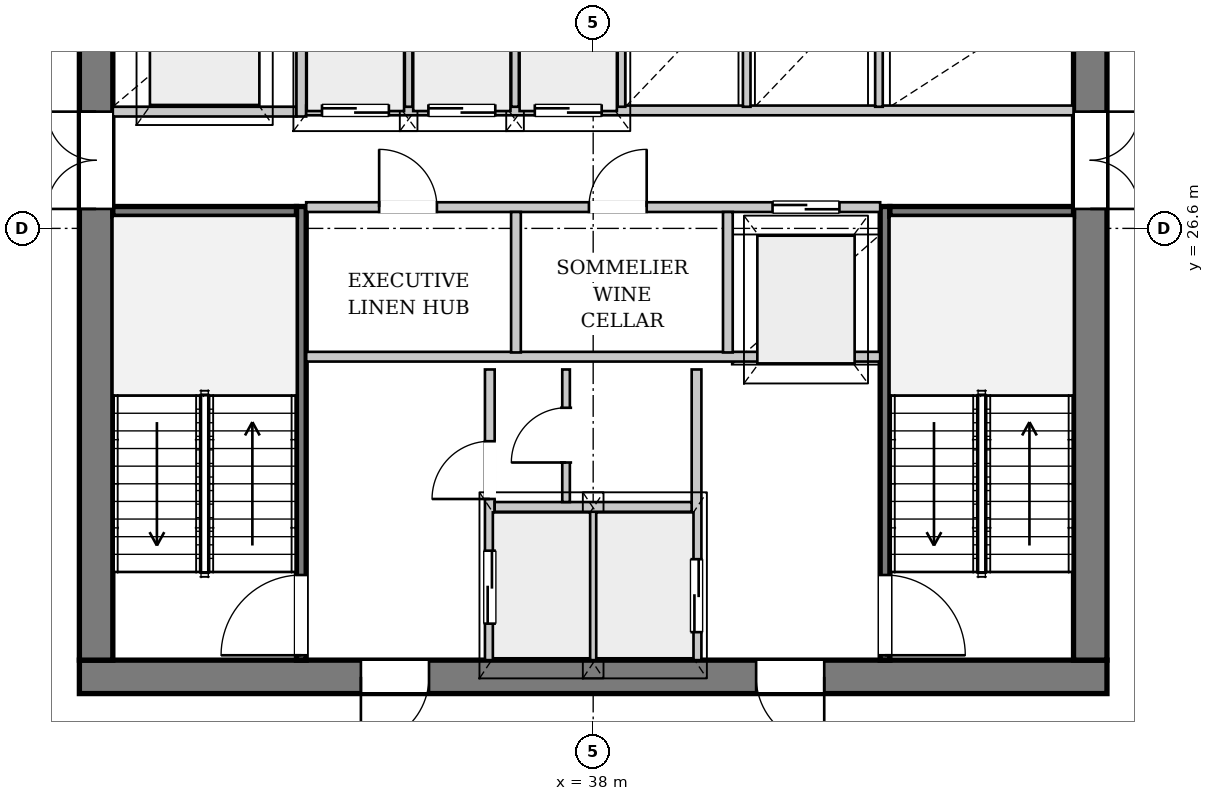
"""IFC4 building model, lengths in metres.
Left out: names, types, materials, properties, quantities, classifications, styles, units other than length and angle.
Written with IfcOpenShell. Run it as: python <this file> out.ifc"""

import sys

from ifc_helpers import new_model, si_unit, direction, frame, frame_2d, origin, place, context, subcontext, project, spatial, rectangle, extrude, source, transform, mapped, element, fill, save


model = new_model("IFC4")
c1 = context("Model", 3, precision=1e-05, world=origin(), true_north=direction((0.0, 1.0)))
c2 = subcontext(c1, "Body", "Model", "MODEL_VIEW")
j1 = project(units=[si_unit("LENGTHUNIT", "METRE"), si_unit("PLANEANGLEUNIT", "RADIAN")], contexts=[c1])
p1 = place(None, origin())
s1 = spatial("IfcSite", under=j1, at=p1, CompositionType="ELEMENT")
p2 = place(p1, origin())
s2 = spatial("IfcBuilding", under=s1, at=p2, CompositionType="ELEMENT")
p3 = place(p2, frame((0.0, 0.0, 150.15)))
s3 = spatial("IfcBuildingStorey", under=s2, at=p3, CompositionType="ELEMENT", Elevation=150.15)
p4 = place(p3, frame((52.782, 18.811, 0.0), z_axis=(0.0, 0.0, 1.0), x_axis=(-0.720961083524, -0.69297555227, 0.0)))
e1 = element("IfcWall", 1, at=p4, inside=s3, PredefinedType="SOLIDWALL", context=c2, shape_type="SweptSolid", body=[
    extrude(rectangle(XDim=23.598, YDim=0.32, at=frame_2d((11.799, 0.0))), origin(), (0.0, 0.0, 1.0), 2.692),
])
p5 = place(p4, frame((6.801, 0.0, 0.0)))
e2 = element("IfcOpeningElement", 2, at=p5, cuts=e1, PredefinedType="OPENING", context=c2, shape_type="SweptSolid", body=[
    extrude(rectangle(XDim=1.5, YDim=2.3, at=frame_2d((0.75, 1.15))), frame((0.0, 0.17, 0.0), z_axis=(0.0, -1.0, 0.0), x_axis=(1.0, 0.0, 0.0)), (0.0, 0.0, 1.0), 0.34),
])
p6 = place(p4, frame((16.163, 0.0, 0.25)))
e3 = element("IfcOpeningElement", 3, at=p6, cuts=e1, PredefinedType="OPENING", context=c2, shape_type="SweptSolid", body=[
    extrude(rectangle(XDim=2.6, YDim=2.35, at=frame_2d((1.3, 1.175))), frame((0.0, 0.17, 0.0), z_axis=(0.0, -1.0, 0.0), x_axis=(1.0, 0.0, 0.0)), (0.0, 0.0, 1.0), 0.34),
])
p7 = place(p3, frame((46.45, 19.225, 0.0), z_axis=(0.0, 0.0, 1.0), x_axis=(-1.0, 0.0, 0.0)))
e4 = element("IfcWall", 4, at=p7, inside=s3, PredefinedType="SHEAR", context=c2, shape_type="SweptSolid", body=[
    extrude(rectangle(XDim=16.9, YDim=0.55, at=frame_2d((8.45, 0.0))), origin(), (0.0, 0.0, 1.0), 3.3),
])
p8 = place(p7, frame((4.65, 0.0, 0.0)))
e5 = element("IfcOpeningElement", 5, at=p8, cuts=e4, PredefinedType="OPENING", context=c2, shape_type="SweptSolid", body=[
    extrude(rectangle(XDim=1.12, YDim=2.25, at=frame_2d((0.56, 1.125))), frame((0.0, 0.285, 0.0), z_axis=(0.0, -1.0, 0.0), x_axis=(1.0, 0.0, 0.0)), (0.0, 0.0, 1.0), 0.57),
])
p9 = place(p7, frame((11.15, 0.0, 0.0)))
e6 = element("IfcOpeningElement", 6, at=p9, cuts=e4, PredefinedType="OPENING", context=c2, shape_type="SweptSolid", body=[
    extrude(rectangle(XDim=1.12, YDim=2.25, at=frame_2d((0.56, 1.125))), frame((0.0, 0.285, 0.0), z_axis=(0.0, -1.0, 0.0), x_axis=(1.0, 0.0, 0.0)), (0.0, 0.0, 1.0), 0.57),
])
p10 = place(p3, frame((29.825, 19.5, 0.0), z_axis=(0.0, 0.0, 1.0), x_axis=(0.0, 1.0, 0.0)))
e7 = element("IfcWall", 7, at=p10, inside=s3, PredefinedType="SHEAR", context=c2, shape_type="SweptSolid", body=[
    extrude(rectangle(XDim=14.2, YDim=0.55, at=frame_2d((7.1, 0.0))), origin(), (0.0, 0.0, 1.0), 3.3),
])
p11 = place(p10, frame((7.42, 0.0, 0.0)))
e8 = element("IfcOpeningElement", 8, at=p11, cuts=e7, PredefinedType="OPENING", context=c2, shape_type="SweptSolid", body=[
    extrude(rectangle(XDim=1.6, YDim=2.2, at=frame_2d((0.8, 1.1))), frame((0.0, 0.285, 0.0), z_axis=(0.0, -1.0, 0.0), x_axis=(1.0, 0.0, 0.0)), (0.0, 0.0, 1.0), 0.57),
])
p12 = place(p3, frame((46.175, 33.7, 0.0), z_axis=(0.0, 0.0, 1.0), x_axis=(0.0, -1.0, 0.0)))
e9 = element("IfcWall", 9, at=p12, inside=s3, PredefinedType="SHEAR", context=c2, shape_type="SweptSolid", body=[
    extrude(rectangle(XDim=14.2, YDim=0.55, at=frame_2d((7.1, 0.0))), origin(), (0.0, 0.0, 1.0), 3.3),
])
p13 = place(p12, frame((5.18, 0.0, 0.0)))
e10 = element("IfcOpeningElement", 10, at=p13, cuts=e9, PredefinedType="OPENING", context=c2, shape_type="SweptSolid", body=[
    extrude(rectangle(XDim=1.6, YDim=2.2, at=frame_2d((0.8, 1.1))), frame((0.0, 0.285, 0.0), z_axis=(0.0, -1.0, 0.0), x_axis=(1.0, 0.0, 0.0)), (0.0, 0.0, 1.0), 0.57),
])
p14 = place(p12, frame((2.05, 0.0, 0.0)))
e11 = element("IfcOpeningElement", 11, at=p14, cuts=e9, PredefinedType="OPENING", context=c2, shape_type="SweptSolid", body=[
    extrude(rectangle(XDim=0.95, YDim=2.1, at=frame_2d((0.475, 1.05))), frame((0.0, 0.285, 0.0), z_axis=(0.0, -1.0, 0.0), x_axis=(1.0, 0.0, 0.0)), (0.0, 0.0, 1.0), 0.57),
])
p15 = place(p3, frame((33.2, 19.5, 0.0), z_axis=(0.0, 0.0, 1.0), x_axis=(0.0, 1.0, 0.0)))
e12 = element("IfcWall", 12, at=p15, inside=s3, PredefinedType="PARTITIONING", context=c2, shape_type="SweptSolid", body=[
    extrude(rectangle(XDim=7.46, YDim=0.16, at=frame_2d((3.73, 0.0))), origin(), (0.0, 0.0, 1.0), 3.3),
])
p16 = place(p15, frame((0.08, 0.0, 0.0)))
e13 = element("IfcOpeningElement", 13, at=p16, cuts=e12, PredefinedType="OPENING", context=c2, shape_type="SweptSolid", body=[
    extrude(rectangle(XDim=1.32, YDim=2.2, at=frame_2d((0.66, 1.1))), frame((0.0, 0.09, 0.0), z_axis=(0.0, -1.0, 0.0), x_axis=(1.0, 0.0, 0.0)), (0.0, 0.0, 1.0), 0.18),
])
p17 = place(p3, frame((30.1, 26.88, 0.0), z_axis=(0.0, 0.0, 1.0), x_axis=(1.0, 0.0, 0.0)))
e14 = element("IfcWall", 14, at=p17, inside=s3, PredefinedType="PARTITIONING", context=c2, shape_type="SweptSolid", body=[
    extrude(rectangle(XDim=3.02, YDim=0.16, at=frame_2d((1.51, 0.0))), origin(), (0.0, 0.0, 1.0), 3.3),
])
p18 = place(p3, frame((42.8, 26.96, 0.0), z_axis=(0.0, 0.0, 1.0), x_axis=(0.0, -1.0, 0.0)))
e15 = element("IfcWall", 15, at=p18, inside=s3, PredefinedType="PARTITIONING", context=c2, shape_type="SweptSolid", body=[
    extrude(rectangle(XDim=7.46, YDim=0.16, at=frame_2d((3.73, 0.0))), origin(), (0.0, 0.0, 1.0), 3.3),
])
p19 = place(p18, frame((6.06, 0.0, 0.0)))
e16 = element("IfcOpeningElement", 16, at=p19, cuts=e15, PredefinedType="OPENING", context=c2, shape_type="SweptSolid", body=[
    extrude(rectangle(XDim=1.32, YDim=2.2, at=frame_2d((0.66, 1.1))), frame((0.0, 0.09, 0.0), z_axis=(0.0, -1.0, 0.0), x_axis=(1.0, 0.0, 0.0)), (0.0, 0.0, 1.0), 0.18),
])
p20 = place(p3, frame((42.88, 26.88, 0.0), z_axis=(0.0, 0.0, 1.0), x_axis=(1.0, 0.0, 0.0)))
e17 = element("IfcWall", 17, at=p20, inside=s3, PredefinedType="PARTITIONING", context=c2, shape_type="SweptSolid", body=[
    extrude(rectangle(XDim=3.02, YDim=0.16, at=frame_2d((1.51, 0.0))), origin(), (0.0, 0.0, 1.0), 3.3),
])
p21 = place(p3, frame((36.3, 19.5, 0.0), z_axis=(0.0, 0.0, 1.0), x_axis=(0.0, 1.0, 0.0)))
e18 = element("IfcWall", 18, at=p21, inside=s3, PredefinedType="PARTITIONING", context=c2, shape_type="SweptSolid", body=[
    extrude(rectangle(XDim=4.78, YDim=0.16, at=frame_2d((2.39, 0.0))), origin(), (0.0, 0.0, 1.0), 3.3),
])
p22 = place(p21, frame((0.6, 0.0, 0.0)))
e19 = element("IfcOpeningElement", 19, at=p22, cuts=e18, PredefinedType="OPENING", context=c2, shape_type="SweptSolid", body=[
    extrude(rectangle(XDim=1.2, YDim=2.2, at=frame_2d((0.6, 1.1))), frame((0.0, 0.09, 0.0), z_axis=(0.0, -1.0, 0.0), x_axis=(1.0, 0.0, 0.0)), (0.0, 0.0, 1.0), 0.18),
])
p23 = place(p21, frame((2.65, 0.0, 0.0)))
e20 = element("IfcOpeningElement", 20, at=p23, cuts=e18, PredefinedType="OPENING", context=c2, shape_type="SweptSolid", body=[
    extrude(rectangle(XDim=0.95, YDim=2.1, at=frame_2d((0.475, 1.05))), frame((0.0, 0.09, 0.0), z_axis=(0.0, -1.0, 0.0), x_axis=(1.0, 0.0, 0.0)), (0.0, 0.0, 1.0), 0.18),
])
p24 = place(p3, frame((39.7, 24.28, 0.0), z_axis=(0.0, 0.0, 1.0), x_axis=(0.0, -1.0, 0.0)))
e21 = element("IfcWall", 21, at=p24, inside=s3, PredefinedType="PARTITIONING", context=c2, shape_type="SweptSolid", body=[
    extrude(rectangle(XDim=4.78, YDim=0.16, at=frame_2d((2.39, 0.0))), origin(), (0.0, 0.0, 1.0), 3.3),
])
p25 = place(p24, frame((3.12, 0.0, 0.0)))
e22 = element("IfcOpeningElement", 22, at=p25, cuts=e21, PredefinedType="OPENING", context=c2, shape_type="SweptSolid", body=[
    extrude(rectangle(XDim=1.2, YDim=2.2, at=frame_2d((0.6, 1.1))), frame((0.0, 0.09, 0.0), z_axis=(0.0, -1.0, 0.0), x_axis=(1.0, 0.0, 0.0)), (0.0, 0.0, 1.0), 0.18),
])
p26 = place(p3, frame((38.0, 19.5, 0.0), z_axis=(0.0, 0.0, 1.0), x_axis=(0.0, 1.0, 0.0)))
e23 = element("IfcWall", 23, at=p26, inside=s3, PredefinedType="PARTITIONING", context=c2, shape_type="SweptSolid", body=[
    extrude(rectangle(XDim=2.46, YDim=0.125, at=frame_2d((1.23, 0.0))), origin(), (0.0, 0.0, 1.0), 3.3),
])
p27 = place(p3, frame((36.38, 22.02, 0.0), z_axis=(0.0, 0.0, 1.0), x_axis=(1.0, 0.0, 0.0)))
e24 = element("IfcWall", 24, at=p27, inside=s3, PredefinedType="PARTITIONING", context=c2, shape_type="SweptSolid", body=[
    extrude(rectangle(XDim=3.24, YDim=0.16, at=frame_2d((1.62, 0.0))), origin(), (0.0, 0.0, 1.0), 3.3),
])
p28 = place(p3, frame((33.28, 24.49, 0.0), z_axis=(0.0, 0.0, 1.0), x_axis=(1.0, 0.0, 0.0)))
e25 = element("IfcWall", 25, at=p28, inside=s3, PredefinedType="PARTITIONING", context=c2, shape_type="SweptSolid", body=[
    extrude(rectangle(XDim=9.44, YDim=0.16, at=frame_2d((4.72, 0.0))), origin(), (0.0, 0.0, 1.0), 3.3),
])
p29 = place(p3, frame((37.554, 22.1, 0.0), z_axis=(0.0, 0.0, 1.0), x_axis=(0.0, 1.0, 0.0)))
e26 = element("IfcWall", 26, at=p29, inside=s3, PredefinedType="PARTITIONING", context=c2, shape_type="SweptSolid", body=[
    extrude(rectangle(XDim=2.18, YDim=0.125, at=frame_2d((1.09, 0.0))), origin(), (0.0, 0.0, 1.0), 3.3),
])
p30 = place(p29, frame((0.65, 0.0, 0.0)))
e27 = element("IfcOpeningElement", 27, at=p30, cuts=e26, PredefinedType="OPENING", context=c2, shape_type="SweptSolid", body=[
    extrude(rectangle(XDim=0.9, YDim=2.1, at=frame_2d((0.45, 1.05))), frame((0.0, 0.073, 0.0), z_axis=(0.0, -1.0, 0.0), x_axis=(1.0, 0.0, 0.0)), (0.0, 0.0, 1.0), 0.145),
])
p31 = place(p3, frame((30.1, 28.52, 0.0), z_axis=(0.0, 0.0, 1.0), x_axis=(1.0, 0.0, 0.0)))
e28 = element("IfcWall", 28, at=p31, inside=s3, PredefinedType="PARTITIONING", context=c2, shape_type="SweptSolid", body=[
    extrude(rectangle(XDim=3.02, YDim=0.16, at=frame_2d((1.51, 0.0))), origin(), (0.0, 0.0, 1.0), 3.3),
])
p32 = place(p3, frame((33.2, 28.44, 0.0), z_axis=(0.0, 0.0, 1.0), x_axis=(0.0, 1.0, 0.0)))
e29 = element("IfcWall", 29, at=p32, inside=s3, PredefinedType="PARTITIONING", context=c2, shape_type="SweptSolid", body=[
    extrude(rectangle(XDim=5.26, YDim=0.16, at=frame_2d((2.63, 0.0))), origin(), (0.0, 0.0, 1.0), 3.3),
])
p33 = place(p3, frame((33.28, 26.95, 0.0), z_axis=(0.0, 0.0, 1.0), x_axis=(1.0, 0.0, 0.0)))
e30 = element("IfcWall", 30, at=p33, inside=s3, PredefinedType="PARTITIONING", context=c2, shape_type="SweptSolid", body=[
    extrude(rectangle(XDim=9.44, YDim=0.16, at=frame_2d((4.72, 0.0))), origin(), (0.0, 0.0, 1.0), 3.3),
])
p34 = place(p33, frame((1.2, 0.0, 0.0)))
e31 = element("IfcOpeningElement", 31, at=p34, cuts=e30, PredefinedType="OPENING", context=c2, shape_type="SweptSolid", body=[
    extrude(rectangle(XDim=0.95, YDim=2.1, at=frame_2d((0.475, 1.05))), frame((0.0, 0.09, 0.0), z_axis=(0.0, -1.0, 0.0), x_axis=(1.0, 0.0, 0.0)), (0.0, 0.0, 1.0), 0.18),
])
p35 = place(p33, frame((4.65, 0.0, 0.0)))
e32 = element("IfcOpeningElement", 32, at=p35, cuts=e30, PredefinedType="OPENING", context=c2, shape_type="SweptSolid", body=[
    extrude(rectangle(XDim=0.95, YDim=2.1, at=frame_2d((0.475, 1.05))), frame((0.0, 0.09, 0.0), z_axis=(0.0, -1.0, 0.0), x_axis=(1.0, 0.0, 0.0)), (0.0, 0.0, 1.0), 0.18),
])
p36 = place(p33, frame((7.67, 0.0, 0.0)))
e33 = element("IfcOpeningElement", 33, at=p36, cuts=e30, PredefinedType="OPENING", context=c2, shape_type="SweptSolid", body=[
    extrude(rectangle(XDim=1.1, YDim=2.2, at=frame_2d((0.55, 1.1))), frame((0.0, 0.09, 0.0), z_axis=(0.0, -1.0, 0.0), x_axis=(1.0, 0.0, 0.0)), (0.0, 0.0, 1.0), 0.18),
])
for number, where, z_axis, x_axis in (
    (34, (36.73, 24.56, 0.0), (0.0, 0.0, 1.0), (0.0, 1.0, 0.0)),
    (35, (40.215, 24.56, 0.0), (0.0, 0.0, 1.0), (0.0, 1.0, 0.0)),
):
    element("IfcWall", number, at=place(p3, frame(where, z_axis=z_axis, x_axis=x_axis)), inside=s3, PredefinedType="PARTITIONING", context=c2, shape_type="SweptSolid", body=[
        extrude(rectangle(XDim=2.31, YDim=0.16, at=frame_2d((1.155, 0.0))), origin(), (0.0, 0.0, 1.0), 3.3),
    ])
p37 = place(p3, frame((33.28, 28.54, 0.0), z_axis=(0.0, 0.0, 1.0), x_axis=(1.0, 0.0, 0.0)))
e36 = element("IfcWall", 36, at=p37, inside=s3, PredefinedType="PARTITIONING", context=c2, shape_type="SweptSolid", body=[
    extrude(rectangle(XDim=12.62, YDim=0.16, at=frame_2d((6.31, 0.0))), origin(), (0.0, 0.0, 1.0), 3.3),
])
p38 = place(p37, frame((0.26, 0.0, 0.0)))
e37 = element("IfcOpeningElement", 37, at=p38, cuts=e36, PredefinedType="OPENING", context=c2, shape_type="SweptSolid", body=[
    extrude(rectangle(XDim=1.1, YDim=2.2, at=frame_2d((0.55, 1.1))), frame((0.0, 0.09, 0.0), z_axis=(0.0, -1.0, 0.0), x_axis=(1.0, 0.0, 0.0)), (0.0, 0.0, 1.0), 0.18),
])
p39 = place(p37, frame((2.01, 0.0, 0.0)))
e38 = element("IfcOpeningElement", 38, at=p39, cuts=e36, PredefinedType="OPENING", context=c2, shape_type="SweptSolid", body=[
    extrude(rectangle(XDim=1.1, YDim=2.2, at=frame_2d((0.55, 1.1))), frame((0.0, 0.09, 0.0), z_axis=(0.0, -1.0, 0.0), x_axis=(1.0, 0.0, 0.0)), (0.0, 0.0, 1.0), 0.18),
])
p40 = place(p37, frame((3.76, 0.0, 0.0)))
e39 = element("IfcOpeningElement", 39, at=p40, cuts=e36, PredefinedType="OPENING", context=c2, shape_type="SweptSolid", body=[
    extrude(rectangle(XDim=1.1, YDim=2.2, at=frame_2d((0.55, 1.1))), frame((0.0, 0.09, 0.0), z_axis=(0.0, -1.0, 0.0), x_axis=(1.0, 0.0, 0.0)), (0.0, 0.0, 1.0), 0.18),
])
for number, where, z_axis, x_axis in (
    (40, (34.965, 28.6, 0.0), (0.0, 0.0, 1.0), (0.0, 1.0, 0.0)),
    (41, (36.715, 28.6, 0.0), (0.0, 0.0, 1.0), (0.0, 1.0, 0.0)),
    (42, (38.465, 28.6, 0.0), (0.0, 0.0, 1.0), (0.0, 1.0, 0.0)),
    (43, (40.525, 28.6, 0.0), (0.0, 0.0, 1.0), (0.0, 1.0, 0.0)),
    (44, (42.7, 28.6, 0.0), (0.0, 0.0, 1.0), (0.0, 1.0, 0.0)),
):
    element("IfcWall", number, at=place(p3, frame(where, z_axis=z_axis, x_axis=x_axis)), inside=s3, PredefinedType="PARTITIONING", context=c2, shape_type="SweptSolid", body=[
        extrude(rectangle(XDim=1.92, YDim=0.125, at=frame_2d((0.96, 0.0))), origin(), (0.0, 0.0, 1.0), 3.3),
    ])
m1 = source(origin(), c2, "Body", "SweptSolid", [
    extrude(rectangle(XDim=1.12, YDim=2.25, at=frame_2d((0.56, 1.125))), frame((0.0, 0.025, 0.0), z_axis=(0.0, -1.0, 0.0), x_axis=(1.0, 0.0, 0.0)), (0.0, 0.0, 1.0), 0.05),
])
p41 = place(p8, origin())
e45 = element("IfcDoor", 45, at=p41, inside=s3, OperationType="SINGLE_SWING_LEFT", PredefinedType="DOOR", context=c2, shape_type="MappedRepresentation", body=[
    mapped(m1, transform((0.0, 0.0, 0.0), x_axis=(1.0, 0.0, 0.0), y_axis=(0.0, 1.0, 0.0), z_axis=(0.0, 0.0, 1.0), scale=1.0)),
])
fill(e5, e45)
p42 = place(p9, origin())
e46 = element("IfcDoor", 46, at=p42, inside=s3, OperationType="SINGLE_SWING_RIGHT", PredefinedType="DOOR", context=c2, shape_type="MappedRepresentation", body=[
    mapped(m1, transform((0.0, 0.0, 0.0), x_axis=(1.0, 0.0, 0.0), y_axis=(0.0, 1.0, 0.0), z_axis=(0.0, 0.0, 1.0), scale=1.0)),
])
fill(e6, e46)
m2 = source(origin(), c2, "Body", "SweptSolid", [
    extrude(rectangle(XDim=1.6, YDim=2.2, at=frame_2d((0.8, 1.1))), frame((0.0, 0.025, 0.0), z_axis=(0.0, -1.0, 0.0), x_axis=(1.0, 0.0, 0.0)), (0.0, 0.0, 1.0), 0.05),
])
p43 = place(p11, origin())
e47 = element("IfcDoor", 47, at=p43, inside=s3, OperationType="DOUBLE_DOOR_SINGLE_SWING", PredefinedType="DOOR", context=c2, shape_type="MappedRepresentation", body=[
    mapped(m2, transform((0.0, 0.0, 0.0), x_axis=(1.0, 0.0, 0.0), y_axis=(0.0, 1.0, 0.0), z_axis=(0.0, 0.0, 1.0), scale=1.0)),
])
fill(e8, e47)
p44 = place(p13, origin())
e48 = element("IfcDoor", 48, at=p44, inside=s3, OperationType="DOUBLE_DOOR_SINGLE_SWING", PredefinedType="DOOR", context=c2, shape_type="MappedRepresentation", body=[
    mapped(m2, transform((0.0, 0.0, 0.0), x_axis=(1.0, 0.0, 0.0), y_axis=(0.0, 1.0, 0.0), z_axis=(0.0, 0.0, 1.0), scale=1.0)),
])
fill(e10, e48)
m3 = source(origin(), c2, "Body", "SweptSolid", [
    extrude(rectangle(XDim=1.32, YDim=2.2, at=frame_2d((0.66, 1.1))), frame((0.0, 0.025, 0.0), z_axis=(0.0, -1.0, 0.0), x_axis=(1.0, 0.0, 0.0)), (0.0, 0.0, 1.0), 0.05),
])
p45 = place(p16, origin())
e49 = element("IfcDoor", 49, at=p45, inside=s3, OperationType="SINGLE_SWING_LEFT", PredefinedType="DOOR", context=c2, shape_type="MappedRepresentation", body=[
    mapped(m3, transform((0.0, 0.0, 0.0), x_axis=(1.0, 0.0, 0.0), y_axis=(0.0, 1.0, 0.0), z_axis=(0.0, 0.0, 1.0), scale=1.0)),
])
fill(e13, e49)
p46 = place(p19, origin())
e50 = element("IfcDoor", 50, at=p46, inside=s3, OperationType="SINGLE_SWING_RIGHT", PredefinedType="DOOR", context=c2, shape_type="MappedRepresentation", body=[
    mapped(m3, transform((0.0, 0.0, 0.0), x_axis=(1.0, 0.0, 0.0), y_axis=(0.0, 1.0, 0.0), z_axis=(0.0, 0.0, 1.0), scale=1.0)),
])
fill(e16, e50)
m4 = source(origin(), c2, "Body", "SweptSolid", [
    extrude(rectangle(XDim=1.2, YDim=2.2, at=frame_2d((0.6, 1.1))), frame((0.0, 0.025, 0.0), z_axis=(0.0, -1.0, 0.0), x_axis=(1.0, 0.0, 0.0)), (0.0, 0.0, 1.0), 0.05),
])
p47 = place(p22, origin())
e51 = element("IfcDoor", 51, at=p47, inside=s3, OperationType="DOUBLE_DOOR_SLIDING", PredefinedType="DOOR", context=c2, shape_type="MappedRepresentation", body=[
    mapped(m4, transform((0.0, 0.0, 0.0), x_axis=(1.0, 0.0, 0.0), y_axis=(0.0, 1.0, 0.0), z_axis=(0.0, 0.0, 1.0), scale=1.0)),
])
fill(e19, e51)
m5 = source(origin(), c2, "Body", "SweptSolid", [
    extrude(rectangle(XDim=0.95, YDim=2.1, at=frame_2d((0.475, 1.05))), frame((0.0, 0.025, 0.0), z_axis=(0.0, -1.0, 0.0), x_axis=(1.0, 0.0, 0.0)), (0.0, 0.0, 1.0), 0.05),
])
p48 = place(p23, origin())
e52 = element("IfcDoor", 52, at=p48, inside=s3, OperationType="SINGLE_SWING_LEFT", PredefinedType="DOOR", context=c2, shape_type="MappedRepresentation", body=[
    mapped(m5, transform((0.0, 0.0, 0.0), x_axis=(1.0, 0.0, 0.0), y_axis=(0.0, 1.0, 0.0), z_axis=(0.0, 0.0, 1.0), scale=1.0)),
])
fill(e20, e52)
m6 = source(origin(), c2, "Body", "SweptSolid", [
    extrude(rectangle(XDim=0.9, YDim=2.1, at=frame_2d((0.45, 1.05))), frame((0.0, 0.025, 0.0), z_axis=(0.0, -1.0, 0.0), x_axis=(1.0, 0.0, 0.0)), (0.0, 0.0, 1.0), 0.05),
])
p49 = place(p30, origin())
e53 = element("IfcDoor", 53, at=p49, inside=s3, OperationType="SINGLE_SWING_LEFT", PredefinedType="DOOR", context=c2, shape_type="MappedRepresentation", body=[
    mapped(m6, transform((0.0, 0.0, 0.0), x_axis=(1.0, 0.0, 0.0), y_axis=(0.0, 1.0, 0.0), z_axis=(0.0, 0.0, 1.0), scale=1.0)),
])
fill(e27, e53)
p50 = place(p25, origin())
e54 = element("IfcDoor", 54, at=p50, inside=s3, OperationType="DOUBLE_DOOR_SLIDING", PredefinedType="DOOR", context=c2, shape_type="MappedRepresentation", body=[
    mapped(m4, transform((0.0, 0.0, 0.0), x_axis=(1.0, 0.0, 0.0), y_axis=(0.0, 1.0, 0.0), z_axis=(0.0, 0.0, 1.0), scale=1.0)),
])
fill(e22, e54)
p51 = place(p34, origin())
e55 = element("IfcDoor", 55, at=p51, inside=s3, OperationType="SINGLE_SWING_LEFT", PredefinedType="DOOR", context=c2, shape_type="MappedRepresentation", body=[
    mapped(m5, transform((0.0, 0.0, 0.0), x_axis=(1.0, 0.0, 0.0), y_axis=(0.0, 1.0, 0.0), z_axis=(0.0, 0.0, 1.0), scale=1.0)),
])
fill(e31, e55)
p52 = place(p35, origin())
e56 = element("IfcDoor", 56, at=p52, inside=s3, OperationType="SINGLE_SWING_RIGHT", PredefinedType="DOOR", context=c2, shape_type="MappedRepresentation", body=[
    mapped(m5, transform((0.0, 0.0, 0.0), x_axis=(1.0, 0.0, 0.0), y_axis=(0.0, 1.0, 0.0), z_axis=(0.0, 0.0, 1.0), scale=1.0)),
])
fill(e32, e56)
m7 = source(origin(), c2, "Body", "SweptSolid", [
    extrude(rectangle(XDim=1.1, YDim=2.2, at=frame_2d((0.55, 1.1))), frame((0.0, 0.025, 0.0), z_axis=(0.0, -1.0, 0.0), x_axis=(1.0, 0.0, 0.0)), (0.0, 0.0, 1.0), 0.05),
])
p53 = place(p36, origin())
e57 = element("IfcDoor", 57, at=p53, inside=s3, OperationType="DOUBLE_DOOR_SLIDING", PredefinedType="DOOR", context=c2, shape_type="MappedRepresentation", body=[
    mapped(m7, transform((0.0, 0.0, 0.0), x_axis=(1.0, 0.0, 0.0), y_axis=(0.0, 1.0, 0.0), z_axis=(0.0, 0.0, 1.0), scale=1.0)),
])
fill(e33, e57)
p54 = place(p38, origin())
e58 = element("IfcDoor", 58, at=p54, inside=s3, OperationType="DOUBLE_DOOR_SLIDING", PredefinedType="DOOR", context=c2, shape_type="MappedRepresentation", body=[
    mapped(m7, transform((0.0, 0.0, 0.0), x_axis=(1.0, 0.0, 0.0), y_axis=(0.0, 1.0, 0.0), z_axis=(0.0, 0.0, 1.0), scale=1.0)),
])
fill(e37, e58)
p55 = place(p39, origin())
e59 = element("IfcDoor", 59, at=p55, inside=s3, OperationType="DOUBLE_DOOR_SLIDING", PredefinedType="DOOR", context=c2, shape_type="MappedRepresentation", body=[
    mapped(m7, transform((0.0, 0.0, 0.0), x_axis=(1.0, 0.0, 0.0), y_axis=(0.0, 1.0, 0.0), z_axis=(0.0, 0.0, 1.0), scale=1.0)),
])
fill(e38, e59)
p56 = place(p40, origin())
e60 = element("IfcDoor", 60, at=p56, inside=s3, OperationType="DOUBLE_DOOR_SLIDING", PredefinedType="DOOR", context=c2, shape_type="MappedRepresentation", body=[
    mapped(m7, transform((0.0, 0.0, 0.0), x_axis=(1.0, 0.0, 0.0), y_axis=(0.0, 1.0, 0.0), z_axis=(0.0, 0.0, 1.0), scale=1.0)),
])
fill(e39, e60)
save(model, sys.argv[1])
